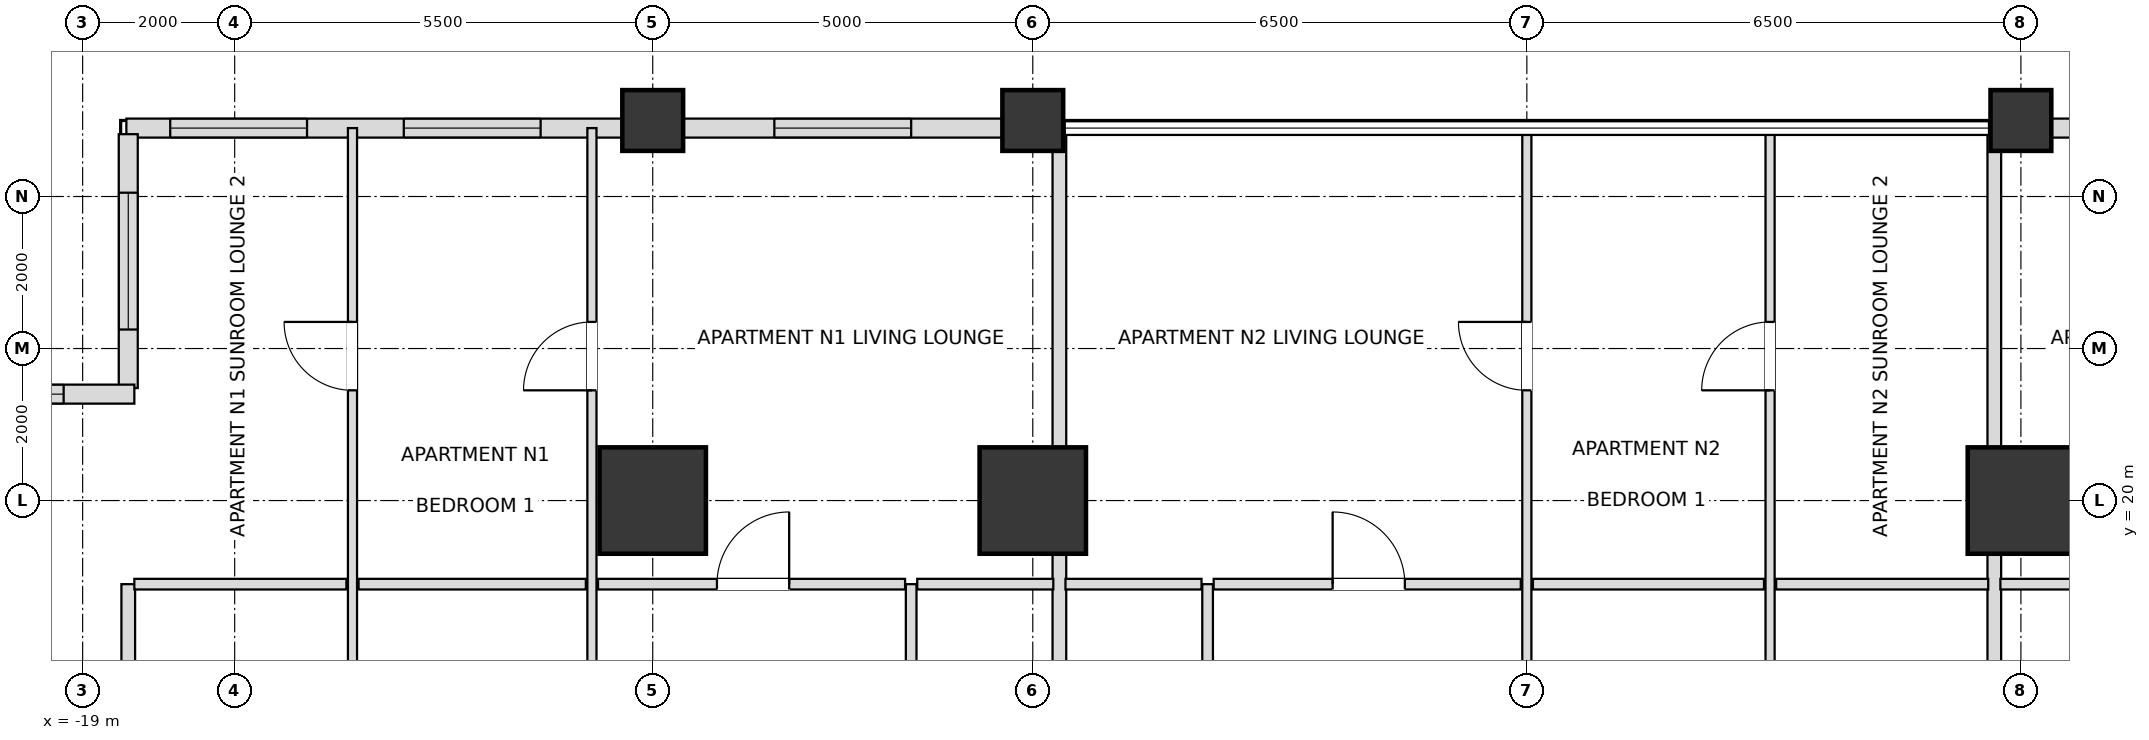
"""IFC4 building model, lengths in metres.
Left out: names, types, materials, properties, quantities, classifications, styles, units other than length and angle.
Written with IfcOpenShell. Run it as: python <this file> out.ifc"""

import sys

from ifc_helpers import new_model, si_unit, direction, frame, frame_2d, origin, origin_2d, place, context, subcontext, project, spatial, rectangle, extrude, element, fill, save


model = new_model("IFC4")
c1 = context("Model", 3, precision=1e-05, world=origin(), true_north=direction((0.0, 1.0)))
c2 = subcontext(c1, "Body", "Model", "MODEL_VIEW")
j1 = project(units=[si_unit("LENGTHUNIT", "METRE"), si_unit("PLANEANGLEUNIT", "RADIAN")], contexts=[c1])
p1 = place(None, origin())
s1 = spatial("IfcSite", under=j1, at=p1, CompositionType="ELEMENT")
p2 = place(p1, origin())
s2 = spatial("IfcBuilding", under=s1, at=p2, CompositionType="ELEMENT")
p3 = place(p2, frame((0.0, 0.0, 46.8)))
s3 = spatial("IfcBuildingStorey", under=s2, at=p3, CompositionType="ELEMENT", Elevation=46.8)
for number, where, z_axis, x_axis in (
    (1, (6.5, 20.0, 0.0), (0.0, 0.0, 1.0), (1.0, 0.0, 0.0)),
    (2, (-6.5, 20.0, 0.0), (0.0, 0.0, 1.0), (1.0, 0.0, 0.0)),
    (3, (-11.5, 20.0, 0.0), (0.0, 0.0, 1.0), (1.0, 0.0, 0.0)),
):
    element("IfcColumn", number, at=place(p3, frame(where, z_axis=z_axis, x_axis=x_axis)), inside=s3, PredefinedType="USERDEFINED", context=c2, shape_type="SweptSolid", body=[
        extrude(rectangle(XDim=1.4, YDim=1.4, at=origin_2d()), origin(), (0.0, 0.0, 1.0), 3.6),
    ])
for number, where, z_axis, x_axis in (
    (4, (-11.5, 25.0, 0.0), (0.0, 0.0, 1.0), (1.0, 0.0, 0.0)),
    (5, (-6.5, 25.0, 0.0), (0.0, 0.0, 1.0), (1.0, 0.0, 0.0)),
    (6, (6.5, 25.0, 0.0), (0.0, 0.0, 1.0), (1.0, 0.0, 0.0)),
):
    element("IfcColumn", number, at=place(p3, frame(where, z_axis=z_axis, x_axis=x_axis)), inside=s3, PredefinedType="COLUMN", context=c2, shape_type="SweptSolid", body=[
        extrude(rectangle(XDim=0.8, YDim=0.8, at=origin_2d()), origin(), (0.0, 0.0, 1.0), 3.6),
    ])
p4 = place(p3, frame((11.105, 24.9, 0.0), z_axis=(0.0, 0.0, 1.0), x_axis=(-1.0, 0.0, 0.0)))
e7 = element("IfcWall", 7, at=p4, inside=s3, PredefinedType="SOLIDWALL", context=c2, shape_type="SweptSolid", body=[
    extrude(rectangle(XDim=4.21, YDim=0.25, at=frame_2d((2.105, 0.0))), origin(), (0.0, 0.0, 1.0), 2.736),
])
p5 = place(p4, frame((1.205, 0.0, 0.72)))
e8 = element("IfcOpeningElement", 8, at=p5, cuts=e7, PredefinedType="OPENING", context=c2, shape_type="SweptSolid", body=[
    extrude(rectangle(XDim=1.8, YDim=1.68, at=frame_2d((0.9, 0.84))), frame((0.0, 0.135, 0.0), z_axis=(0.0, -1.0, 0.0), x_axis=(1.0, 0.0, 0.0)), (0.0, 0.0, 1.0), 0.27),
])
p6 = place(p3, frame((-6.895, 24.9, 0.0), z_axis=(0.0, 0.0, 1.0), x_axis=(-1.0, 0.0, 0.0)))
e9 = element("IfcWall", 9, at=p6, inside=s3, PredefinedType="SOLIDWALL", context=c2, shape_type="SweptSolid", body=[
    extrude(rectangle(XDim=4.21, YDim=0.25, at=frame_2d((2.105, 0.0))), origin(), (0.0, 0.0, 1.0), 2.736),
])
p7 = place(p6, frame((1.205, 0.0, 0.72)))
e10 = element("IfcOpeningElement", 10, at=p7, cuts=e9, PredefinedType="OPENING", context=c2, shape_type="SweptSolid", body=[
    extrude(rectangle(XDim=1.8, YDim=1.68, at=frame_2d((0.9, 0.84))), frame((0.0, 0.135, 0.0), z_axis=(0.0, -1.0, 0.0), x_axis=(1.0, 0.0, 0.0)), (0.0, 0.0, 1.0), 0.27),
])
p8 = place(p3, frame((-11.895, 24.9, 0.0), z_axis=(0.0, 0.0, 1.0), x_axis=(-1.0, 0.0, 0.0)))
e11 = element("IfcWall", 11, at=p8, inside=s3, PredefinedType="SOLIDWALL", context=c2, shape_type="SweptSolid", body=[
    extrude(rectangle(XDim=6.53, YDim=0.25, at=frame_2d((3.265, 0.0))), origin(), (0.0, 0.0, 1.0), 2.736),
])
p9 = place(p8, frame((1.08, 0.0, 0.72)))
e12 = element("IfcOpeningElement", 12, at=p9, cuts=e11, PredefinedType="OPENING", context=c2, shape_type="SweptSolid", body=[
    extrude(rectangle(XDim=1.8, YDim=1.68, at=frame_2d((0.9, 0.84))), frame((0.0, 0.135, 0.0), z_axis=(0.0, -1.0, 0.0), x_axis=(1.0, 0.0, 0.0)), (0.0, 0.0, 1.0), 0.27),
])
p10 = place(p8, frame((4.153, 0.0, 0.72)))
e13 = element("IfcOpeningElement", 13, at=p10, cuts=e11, PredefinedType="OPENING", context=c2, shape_type="SweptSolid", body=[
    extrude(rectangle(XDim=1.8, YDim=1.68, at=frame_2d((0.9, 0.84))), frame((0.0, 0.135, 0.0), z_axis=(0.0, -1.0, 0.0), x_axis=(1.0, 0.0, 0.0)), (0.0, 0.0, 1.0), 0.27),
])
p11 = place(p3, frame((-18.4, 24.82, 0.0), z_axis=(0.0, 0.0, 1.0), x_axis=(0.0, -1.0, 0.0)))
e14 = element("IfcWall", 14, at=p11, inside=s3, PredefinedType="SOLIDWALL", context=c2, shape_type="SweptSolid", body=[
    extrude(rectangle(XDim=3.34, YDim=0.25, at=frame_2d((1.67, 0.0))), origin(), (0.0, 0.0, 1.0), 2.736),
])
p12 = place(p11, frame((0.77, 0.0, 0.72)))
e15 = element("IfcOpeningElement", 15, at=p12, cuts=e14, PredefinedType="OPENING", context=c2, shape_type="SweptSolid", body=[
    extrude(rectangle(XDim=1.8, YDim=1.68, at=frame_2d((0.9, 0.84))), frame((0.0, 0.135, 0.0), z_axis=(0.0, -1.0, 0.0), x_axis=(1.0, 0.0, 0.0)), (0.0, 0.0, 1.0), 0.27),
])
p13 = place(p3, frame((-18.32, 21.4, 0.0), z_axis=(0.0, 0.0, 1.0), x_axis=(-1.0, 0.0, 0.0)))
e16 = element("IfcWall", 16, at=p13, inside=s3, PredefinedType="SOLIDWALL", context=c2, shape_type="SweptSolid", body=[
    extrude(rectangle(XDim=3.66, YDim=0.25, at=frame_2d((1.83, 0.0))), origin(), (0.0, 0.0, 1.0), 2.736),
])
p14 = place(p13, frame((0.93, 0.0, 0.72)))
e17 = element("IfcOpeningElement", 17, at=p14, cuts=e16, PredefinedType="OPENING", context=c2, shape_type="SweptSolid", body=[
    extrude(rectangle(XDim=1.8, YDim=1.68, at=frame_2d((0.9, 0.84))), frame((0.0, 0.135, 0.0), z_axis=(0.0, -1.0, 0.0), x_axis=(1.0, 0.0, 0.0)), (0.0, 0.0, 1.0), 0.27),
])
p15 = place(p3, frame((-18.4, 9.3, 0.0), z_axis=(0.0, 0.0, 1.0), x_axis=(0.0, 1.0, 0.0)))
e18 = element("IfcWall", 18, at=p15, inside=s3, PredefinedType="PARTITIONING", context=c2, shape_type="SweptSolid", body=[
    extrude(rectangle(XDim=9.6, YDim=0.18, at=frame_2d((4.8, 0.0))), origin(), (0.0, 0.0, 1.0), 2.736),
])
p16 = place(p3, frame((-15.45, 9.3, 0.0), z_axis=(0.0, 0.0, 1.0), x_axis=(0.0, 1.0, 0.0)))
e19 = element("IfcWall", 19, at=p16, inside=s3, PredefinedType="PARTITIONING", context=c2, shape_type="SweptSolid", body=[
    extrude(rectangle(XDim=15.6, YDim=0.12, at=frame_2d((7.8, 0.0))), origin(), (0.0, 0.0, 1.0), 2.736),
])
p17 = place(p16, frame((4.478, 0.0, 0.0)))
e20 = element("IfcOpeningElement", 20, at=p17, cuts=e19, PredefinedType="OPENING", context=c2, shape_type="SweptSolid", body=[
    extrude(rectangle(XDim=0.9, YDim=2.1, at=frame_2d((0.45, 1.05))), frame((0.0, 0.07, 0.0), z_axis=(0.0, -1.0, 0.0), x_axis=(1.0, 0.0, 0.0)), (0.0, 0.0, 1.0), 0.14),
])
p18 = place(p16, frame((12.15, 0.0, 0.0)))
e21 = element("IfcOpeningElement", 21, at=p18, cuts=e19, PredefinedType="OPENING", context=c2, shape_type="SweptSolid", body=[
    extrude(rectangle(XDim=0.9, YDim=2.1, at=frame_2d((0.45, 1.05))), frame((0.0, 0.07, 0.0), z_axis=(0.0, -1.0, 0.0), x_axis=(1.0, 0.0, 0.0)), (0.0, 0.0, 1.0), 0.14),
])
p19 = place(p3, frame((-12.3, 9.3, 0.0), z_axis=(0.0, 0.0, 1.0), x_axis=(0.0, 1.0, 0.0)))
e22 = element("IfcWall", 22, at=p19, inside=s3, PredefinedType="PARTITIONING", context=c2, shape_type="SweptSolid", body=[
    extrude(rectangle(XDim=15.6, YDim=0.12, at=frame_2d((7.8, 0.0))), origin(), (0.0, 0.0, 1.0), 2.736),
])
p20 = place(p19, frame((4.325, 0.0, 0.0)))
e23 = element("IfcOpeningElement", 23, at=p20, cuts=e22, PredefinedType="OPENING", context=c2, shape_type="SweptSolid", body=[
    extrude(rectangle(XDim=0.95, YDim=2.1, at=frame_2d((0.475, 1.05))), frame((0.0, 0.07, 0.0), z_axis=(0.0, -1.0, 0.0), x_axis=(1.0, 0.0, 0.0)), (0.0, 0.0, 1.0), 0.14),
])
p21 = place(p19, frame((12.15, 0.0, 0.0)))
e24 = element("IfcOpeningElement", 24, at=p21, cuts=e22, PredefinedType="OPENING", context=c2, shape_type="SweptSolid", body=[
    extrude(rectangle(XDim=0.9, YDim=2.1, at=frame_2d((0.45, 1.05))), frame((0.0, 0.07, 0.0), z_axis=(0.0, -1.0, 0.0), x_axis=(1.0, 0.0, 0.0)), (0.0, 0.0, 1.0), 0.14),
])
p22 = place(p3, frame((-8.1, 9.3, 0.0), z_axis=(0.0, 0.0, 1.0), x_axis=(0.0, 1.0, 0.0)))
e25 = element("IfcWall", 25, at=p22, inside=s3, PredefinedType="PARTITIONING", context=c2, shape_type="SweptSolid", body=[
    extrude(rectangle(XDim=9.6, YDim=0.14, at=frame_2d((4.8, 0.0))), origin(), (0.0, 0.0, 1.0), 2.816),
])
p23 = place(p22, frame((4.35, 0.0, 0.0)))
e26 = element("IfcOpeningElement", 26, at=p23, cuts=e25, PredefinedType="OPENING", context=c2, shape_type="SweptSolid", body=[
    extrude(rectangle(XDim=0.9, YDim=2.1, at=frame_2d((0.45, 1.05))), frame((0.0, 0.08, 0.0), z_axis=(0.0, -1.0, 0.0), x_axis=(1.0, 0.0, 0.0)), (0.0, 0.0, 1.0), 0.16),
])
p24 = place(p3, frame((-6.15, 9.3, 0.0), z_axis=(0.0, 0.0, 1.0), x_axis=(0.0, 1.0, 0.0)))
e27 = element("IfcWall", 27, at=p24, inside=s3, PredefinedType="PARTITIONING", context=c2, shape_type="SweptSolid", body=[
    extrude(rectangle(XDim=15.6, YDim=0.18, at=frame_2d((7.8, 0.0))), origin(), (0.0, 0.0, 1.0), 2.816),
])
p25 = place(p3, frame((-4.2, 9.3, 0.0), z_axis=(0.0, 0.0, 1.0), x_axis=(0.0, 1.0, 0.0)))
e28 = element("IfcWall", 28, at=p25, inside=s3, PredefinedType="PARTITIONING", context=c2, shape_type="SweptSolid", body=[
    extrude(rectangle(XDim=9.6, YDim=0.14, at=frame_2d((4.8, 0.0))), origin(), (0.0, 0.0, 1.0), 2.948),
])
p26 = place(p25, frame((4.35, 0.0, 0.0)))
e29 = element("IfcOpeningElement", 29, at=p26, cuts=e28, PredefinedType="OPENING", context=c2, shape_type="SweptSolid", body=[
    extrude(rectangle(XDim=0.9, YDim=2.1, at=frame_2d((0.45, 1.05))), frame((0.0, 0.08, 0.0), z_axis=(0.0, -1.0, 0.0), x_axis=(1.0, 0.0, 0.0)), (0.0, 0.0, 1.0), 0.16),
])
p27 = place(p3, frame((0.0, 9.3, 0.0), z_axis=(0.0, 0.0, 1.0), x_axis=(0.0, 1.0, 0.0)))
e30 = element("IfcWall", 30, at=p27, inside=s3, PredefinedType="PARTITIONING", context=c2, shape_type="SweptSolid", body=[
    extrude(rectangle(XDim=15.6, YDim=0.12, at=frame_2d((7.8, 0.0))), origin(), (0.0, 0.0, 1.0), 2.816),
])
p28 = place(p27, frame((4.325, 0.0, 0.0)))
e31 = element("IfcOpeningElement", 31, at=p28, cuts=e30, PredefinedType="OPENING", context=c2, shape_type="SweptSolid", body=[
    extrude(rectangle(XDim=0.95, YDim=2.1, at=frame_2d((0.475, 1.05))), frame((0.0, 0.07, 0.0), z_axis=(0.0, -1.0, 0.0), x_axis=(1.0, 0.0, 0.0)), (0.0, 0.0, 1.0), 0.14),
])
p29 = place(p27, frame((12.15, 0.0, 0.0)))
e32 = element("IfcOpeningElement", 32, at=p29, cuts=e30, PredefinedType="OPENING", context=c2, shape_type="SweptSolid", body=[
    extrude(rectangle(XDim=0.9, YDim=2.1, at=frame_2d((0.45, 1.05))), frame((0.0, 0.07, 0.0), z_axis=(0.0, -1.0, 0.0), x_axis=(1.0, 0.0, 0.0)), (0.0, 0.0, 1.0), 0.14),
])
p30 = place(p3, frame((3.2, 9.3, 0.0), z_axis=(0.0, 0.0, 1.0), x_axis=(0.0, 1.0, 0.0)))
e33 = element("IfcWall", 33, at=p30, inside=s3, PredefinedType="PARTITIONING", context=c2, shape_type="SweptSolid", body=[
    extrude(rectangle(XDim=15.6, YDim=0.12, at=frame_2d((7.8, 0.0))), origin(), (0.0, 0.0, 1.0), 2.816),
])
p31 = place(p30, frame((4.35, 0.0, 0.0)))
e34 = element("IfcOpeningElement", 34, at=p31, cuts=e33, PredefinedType="OPENING", context=c2, shape_type="SweptSolid", body=[
    extrude(rectangle(XDim=0.9, YDim=2.1, at=frame_2d((0.45, 1.05))), frame((0.0, 0.07, 0.0), z_axis=(0.0, -1.0, 0.0), x_axis=(1.0, 0.0, 0.0)), (0.0, 0.0, 1.0), 0.14),
])
p32 = place(p30, frame((12.15, 0.0, 0.0)))
e35 = element("IfcOpeningElement", 35, at=p32, cuts=e33, PredefinedType="OPENING", context=c2, shape_type="SweptSolid", body=[
    extrude(rectangle(XDim=0.9, YDim=2.1, at=frame_2d((0.45, 1.05))), frame((0.0, 0.07, 0.0), z_axis=(0.0, -1.0, 0.0), x_axis=(1.0, 0.0, 0.0)), (0.0, 0.0, 1.0), 0.14),
])
p33 = place(p3, frame((6.15, 9.3, 0.0), z_axis=(0.0, 0.0, 1.0), x_axis=(0.0, 1.0, 0.0)))
e36 = element("IfcWall", 36, at=p33, inside=s3, PredefinedType="PARTITIONING", context=c2, shape_type="SweptSolid", body=[
    extrude(rectangle(XDim=15.6, YDim=0.18, at=frame_2d((7.8, 0.0))), origin(), (0.0, 0.0, 1.0), 2.816),
])
p34 = place(p3, frame((-18.32, 18.9, 0.0), z_axis=(0.0, 0.0, 1.0), x_axis=(1.0, 0.0, 0.0)))
e37 = element("IfcWall", 37, at=p34, inside=s3, PredefinedType="PARTITIONING", context=c2, shape_type="SweptSolid", body=[
    extrude(rectangle(XDim=2.79, YDim=0.14, at=frame_2d((1.395, 0.0))), origin(), (0.0, 0.0, 1.0), 2.736),
])
p35 = place(p3, frame((-15.37, 18.9, 0.0), z_axis=(0.0, 0.0, 1.0), x_axis=(1.0, 0.0, 0.0)))
e38 = element("IfcWall", 38, at=p35, inside=s3, PredefinedType="PARTITIONING", context=c2, shape_type="SweptSolid", body=[
    extrude(rectangle(XDim=2.99, YDim=0.14, at=frame_2d((1.495, 0.0))), origin(), (0.0, 0.0, 1.0), 2.736),
])
p36 = place(p3, frame((-12.22, 18.9, 0.0), z_axis=(0.0, 0.0, 1.0), x_axis=(1.0, 0.0, 0.0)))
e39 = element("IfcWall", 39, at=p36, inside=s3, PredefinedType="PARTITIONING", context=c2, shape_type="SweptSolid", body=[
    extrude(rectangle(XDim=4.04, YDim=0.14, at=frame_2d((2.02, 0.0))), origin(), (0.0, 0.0, 1.0), 2.736),
])
p37 = place(p36, frame((1.565, 0.0, 0.0)))
e40 = element("IfcOpeningElement", 40, at=p37, cuts=e39, PredefinedType="OPENING", context=c2, shape_type="SweptSolid", body=[
    extrude(rectangle(XDim=0.95, YDim=2.1, at=frame_2d((0.475, 1.05))), frame((0.0, 0.08, 0.0), z_axis=(0.0, -1.0, 0.0), x_axis=(1.0, 0.0, 0.0)), (0.0, 0.0, 1.0), 0.16),
])
p38 = place(p3, frame((-8.02, 18.9, 0.0), z_axis=(0.0, 0.0, 1.0), x_axis=(1.0, 0.0, 0.0)))
e41 = element("IfcWall", 41, at=p38, inside=s3, PredefinedType="PARTITIONING", context=c2, shape_type="SweptSolid", body=[
    extrude(rectangle(XDim=1.79, YDim=0.14, at=frame_2d((0.895, 0.0))), origin(), (0.0, 0.0, 1.0), 2.816),
])
p39 = place(p3, frame((-6.07, 18.9, 0.0), z_axis=(0.0, 0.0, 1.0), x_axis=(1.0, 0.0, 0.0)))
e42 = element("IfcWall", 42, at=p39, inside=s3, PredefinedType="PARTITIONING", context=c2, shape_type="SweptSolid", body=[
    extrude(rectangle(XDim=1.79, YDim=0.14, at=frame_2d((0.895, 0.0))), origin(), (0.0, 0.0, 1.0), 3.38),
])
p40 = place(p3, frame((-4.12, 18.9, 0.0), z_axis=(0.0, 0.0, 1.0), x_axis=(1.0, 0.0, 0.0)))
e43 = element("IfcWall", 43, at=p40, inside=s3, PredefinedType="PARTITIONING", context=c2, shape_type="SweptSolid", body=[
    extrude(rectangle(XDim=4.04, YDim=0.14, at=frame_2d((2.02, 0.0))), origin(), (0.0, 0.0, 1.0), 3.38),
])
p41 = place(p40, frame((1.565, 0.0, 0.0)))
e44 = element("IfcOpeningElement", 44, at=p41, cuts=e43, PredefinedType="OPENING", context=c2, shape_type="SweptSolid", body=[
    extrude(rectangle(XDim=0.95, YDim=2.1, at=frame_2d((0.475, 1.05))), frame((0.0, 0.08, 0.0), z_axis=(0.0, -1.0, 0.0), x_axis=(1.0, 0.0, 0.0)), (0.0, 0.0, 1.0), 0.16),
])
p42 = place(p3, frame((0.08, 18.9, 0.0), z_axis=(0.0, 0.0, 1.0), x_axis=(1.0, 0.0, 0.0)))
e45 = element("IfcWall", 45, at=p42, inside=s3, PredefinedType="PARTITIONING", context=c2, shape_type="SweptSolid", body=[
    extrude(rectangle(XDim=3.04, YDim=0.14, at=frame_2d((1.52, 0.0))), origin(), (0.0, 0.0, 1.0), 3.38),
])
p43 = place(p3, frame((3.28, 18.9, 0.0), z_axis=(0.0, 0.0, 1.0), x_axis=(1.0, 0.0, 0.0)))
e46 = element("IfcWall", 46, at=p43, inside=s3, PredefinedType="PARTITIONING", context=c2, shape_type="SweptSolid", body=[
    extrude(rectangle(XDim=2.79, YDim=0.14, at=frame_2d((1.395, 0.0))), origin(), (0.0, 0.0, 1.0), 3.38),
])
p44 = place(p3, frame((6.23, 18.9, 0.0), z_axis=(0.0, 0.0, 1.0), x_axis=(1.0, 0.0, 0.0)))
e47 = element("IfcWall", 47, at=p44, inside=s3, PredefinedType="PARTITIONING", context=c2, shape_type="SweptSolid", body=[
    extrude(rectangle(XDim=1.79, YDim=0.14, at=frame_2d((0.895, 0.0))), origin(), (0.0, 0.0, 1.0), 2.816),
])
p45 = place(p7, origin())
e48 = element("IfcWindow", 48, at=p45, inside=s3, PartitioningType="SINGLE_PANEL", PredefinedType="WINDOW", context=c2, shape_type="SweptSolid", body=[
    extrude(rectangle(XDim=1.8, YDim=1.68, at=frame_2d((0.9, 0.84))), frame((0.0, 0.03, 0.0), z_axis=(0.0, -1.0, 0.0), x_axis=(1.0, 0.0, 0.0)), (0.0, 0.0, 1.0), 0.06),
])
fill(e10, e48)
p46 = place(p9, origin())
e49 = element("IfcWindow", 49, at=p46, inside=s3, PartitioningType="SINGLE_PANEL", PredefinedType="WINDOW", context=c2, shape_type="SweptSolid", body=[
    extrude(rectangle(XDim=1.8, YDim=1.68, at=frame_2d((0.9, 0.84))), frame((0.0, 0.03, 0.0), z_axis=(0.0, -1.0, 0.0), x_axis=(1.0, 0.0, 0.0)), (0.0, 0.0, 1.0), 0.06),
])
fill(e12, e49)
p47 = place(p10, origin())
e50 = element("IfcWindow", 50, at=p47, inside=s3, PartitioningType="SINGLE_PANEL", PredefinedType="WINDOW", context=c2, shape_type="SweptSolid", body=[
    extrude(rectangle(XDim=1.8, YDim=1.68, at=frame_2d((0.9, 0.84))), frame((0.0, 0.03, 0.0), z_axis=(0.0, -1.0, 0.0), x_axis=(1.0, 0.0, 0.0)), (0.0, 0.0, 1.0), 0.06),
])
fill(e13, e50)
p48 = place(p12, origin())
e51 = element("IfcWindow", 51, at=p48, inside=s3, PartitioningType="SINGLE_PANEL", PredefinedType="WINDOW", context=c2, shape_type="SweptSolid", body=[
    extrude(rectangle(XDim=1.8, YDim=1.68, at=frame_2d((0.9, 0.84))), frame((0.0, 0.03, 0.0), z_axis=(0.0, -1.0, 0.0), x_axis=(1.0, 0.0, 0.0)), (0.0, 0.0, 1.0), 0.06),
])
fill(e15, e51)
p49 = place(p14, origin())
e52 = element("IfcWindow", 52, at=p49, inside=s3, PartitioningType="SINGLE_PANEL", PredefinedType="WINDOW", context=c2, shape_type="SweptSolid", body=[
    extrude(rectangle(XDim=1.8, YDim=1.68, at=frame_2d((0.9, 0.84))), frame((0.0, 0.03, 0.0), z_axis=(0.0, -1.0, 0.0), x_axis=(1.0, 0.0, 0.0)), (0.0, 0.0, 1.0), 0.06),
])
fill(e17, e52)
p50 = place(p37, origin())
e53 = element("IfcDoor", 53, at=p50, inside=s3, OperationType="SINGLE_SWING_RIGHT", PredefinedType="DOOR", context=c2, shape_type="SweptSolid", body=[
    extrude(rectangle(XDim=0.95, YDim=2.1, at=frame_2d((0.475, 1.05))), frame((0.0, 0.025, 0.0), z_axis=(0.0, -1.0, 0.0), x_axis=(1.0, 0.0, 0.0)), (0.0, 0.0, 1.0), 0.05),
])
fill(e40, e53)
p51 = place(p21, origin())
e54 = element("IfcDoor", 54, at=p51, inside=s3, OperationType="SINGLE_SWING_LEFT", PredefinedType="DOOR", context=c2, shape_type="SweptSolid", body=[
    extrude(rectangle(XDim=0.9, YDim=2.1, at=frame_2d((0.45, 1.05))), frame((0.0, 0.025, 0.0), z_axis=(0.0, -1.0, 0.0), x_axis=(1.0, 0.0, 0.0)), (0.0, 0.0, 1.0), 0.05),
])
fill(e24, e54)
p52 = place(p18, origin())
e55 = element("IfcDoor", 55, at=p52, inside=s3, OperationType="SINGLE_SWING_RIGHT", PredefinedType="DOOR", context=c2, shape_type="SweptSolid", body=[
    extrude(rectangle(XDim=0.9, YDim=2.1, at=frame_2d((0.45, 1.05))), frame((0.0, 0.025, 0.0), z_axis=(0.0, -1.0, 0.0), x_axis=(1.0, 0.0, 0.0)), (0.0, 0.0, 1.0), 0.05),
])
fill(e21, e55)
p53 = place(p41, origin())
e56 = element("IfcDoor", 56, at=p53, inside=s3, OperationType="SINGLE_SWING_LEFT", PredefinedType="DOOR", context=c2, shape_type="SweptSolid", body=[
    extrude(rectangle(XDim=0.95, YDim=2.1, at=frame_2d((0.475, 1.05))), frame((0.0, 0.025, 0.0), z_axis=(0.0, -1.0, 0.0), x_axis=(1.0, 0.0, 0.0)), (0.0, 0.0, 1.0), 0.05),
])
fill(e44, e56)
p54 = place(p29, origin())
e57 = element("IfcDoor", 57, at=p54, inside=s3, OperationType="SINGLE_SWING_RIGHT", PredefinedType="DOOR", context=c2, shape_type="SweptSolid", body=[
    extrude(rectangle(XDim=0.9, YDim=2.1, at=frame_2d((0.45, 1.05))), frame((0.0, 0.025, 0.0), z_axis=(0.0, -1.0, 0.0), x_axis=(1.0, 0.0, 0.0)), (0.0, 0.0, 1.0), 0.05),
])
fill(e32, e57)
p55 = place(p32, origin())
e58 = element("IfcDoor", 58, at=p55, inside=s3, OperationType="SINGLE_SWING_LEFT", PredefinedType="DOOR", context=c2, shape_type="SweptSolid", body=[
    extrude(rectangle(XDim=0.9, YDim=2.1, at=frame_2d((0.45, 1.05))), frame((0.0, 0.025, 0.0), z_axis=(0.0, -1.0, 0.0), x_axis=(1.0, 0.0, 0.0)), (0.0, 0.0, 1.0), 0.05),
])
fill(e35, e58)
save(model, sys.argv[1])
